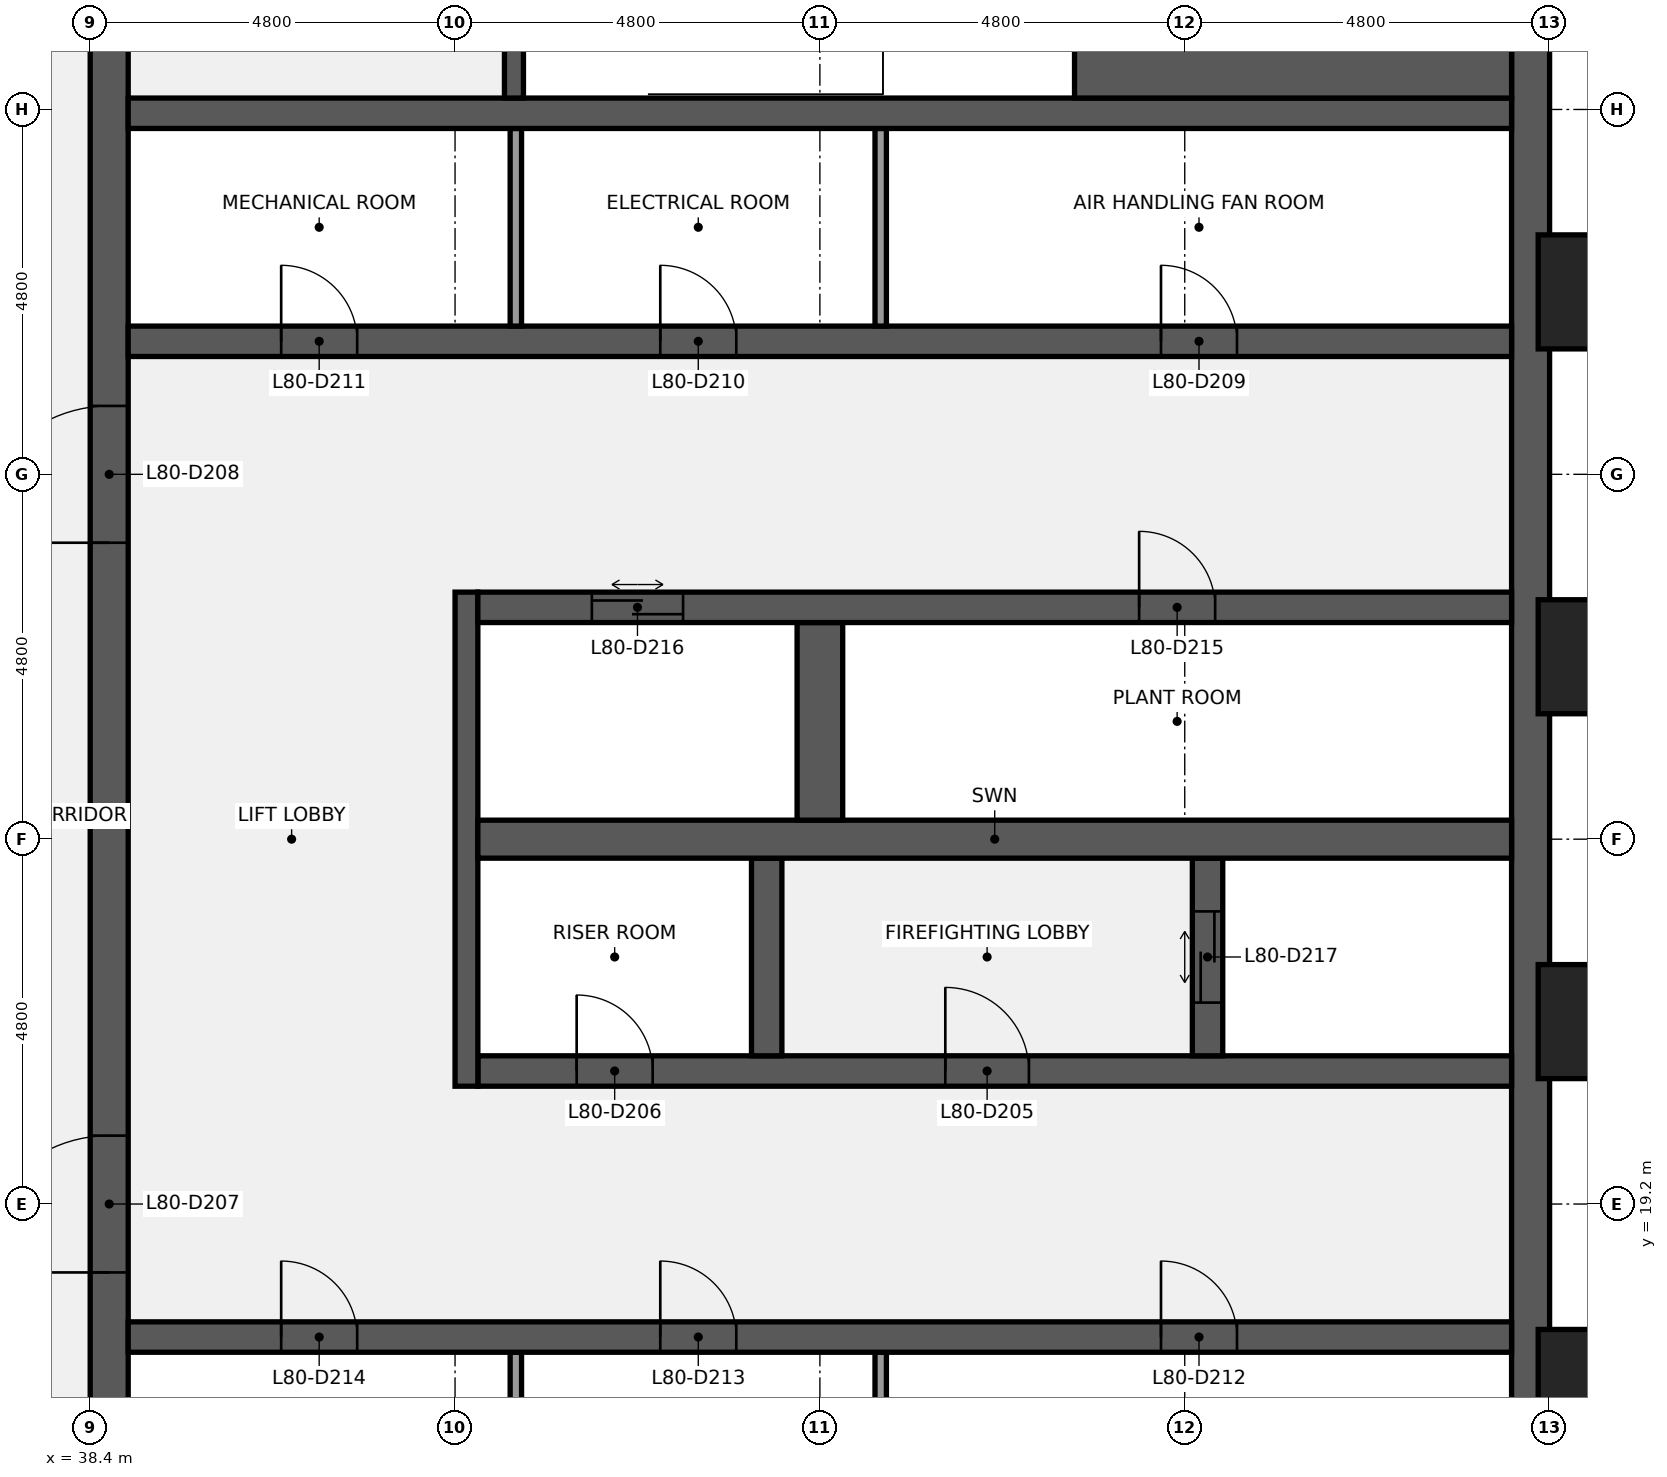
"""IFC4 building model, lengths in metres.
Left out: names, types, materials, properties, quantities, classifications, styles, units other than length and angle.
Written with IfcOpenShell. Run it as: python <this file> out.ifc"""

import sys

from ifc_helpers import new_model, si_unit, direction, frame, frame_2d, origin, origin_2d, place, context, subcontext, project, spatial, rectangle, extrude, element, fill, save


model = new_model("IFC4")
c1 = context("Model", 3, precision=1e-05, world=origin(), true_north=direction((0.0, 1.0)))
c2 = subcontext(c1, "Body", "Model", "MODEL_VIEW")
j1 = project(units=[si_unit("LENGTHUNIT", "METRE"), si_unit("PLANEANGLEUNIT", "RADIAN")], contexts=[c1])
p1 = place(None, origin())
s1 = spatial("IfcSite", under=j1, at=p1, CompositionType="ELEMENT")
p2 = place(p1, origin())
s2 = spatial("IfcBuilding", under=s1, at=p2, CompositionType="ELEMENT")
p3 = place(p2, frame((0.0, 0.0, 358.3)))
s3 = spatial("IfcBuildingStorey", under=s2, at=p3, CompositionType="ELEMENT", Elevation=358.3)
p4 = place(p3, frame((57.35, 38.4, 0.0), z_axis=(0.0, 0.0, 1.0), x_axis=(0.0, -1.0, 0.0)))
e1 = element("IfcWall", 1, at=p4, inside=s3, PredefinedType="SHEAR", context=c2, shape_type="SweptSolid", body=[
    extrude(rectangle(XDim=28.8, YDim=0.5, at=frame_2d((14.4, 0.0))), origin(), (0.0, 0.0, 1.0), 3.75),
])
p5 = place(p3, frame((38.65, 9.6, 0.0), z_axis=(0.0, 0.0, 1.0), x_axis=(0.0, 1.0, 0.0)))
e2 = element("IfcWall", 2, at=p5, inside=s3, PredefinedType="SHEAR", context=c2, shape_type="SweptSolid", body=[
    extrude(rectangle(XDim=28.8, YDim=0.5, at=frame_2d((14.4, 0.0))), origin(), (0.0, 0.0, 1.0), 3.75),
])
p6 = place(p5, frame((8.7, 0.0, 0.0)))
e3 = element("IfcOpeningElement", 3, at=p6, cuts=e2, PredefinedType="OPENING", context=c2, shape_type="SweptSolid", body=[
    extrude(rectangle(XDim=1.8, YDim=2.1, at=frame_2d((0.9, 1.05))), frame((0.0, 0.26, 0.0), z_axis=(0.0, -1.0, 0.0), x_axis=(1.0, 0.0, 0.0)), (0.0, 0.0, 1.0), 0.52),
])
p7 = place(p5, frame((18.3, 0.0, 0.0)))
e4 = element("IfcOpeningElement", 4, at=p7, cuts=e2, PredefinedType="OPENING", context=c2, shape_type="SweptSolid", body=[
    extrude(rectangle(XDim=1.8, YDim=2.1, at=frame_2d((0.9, 1.05))), frame((0.0, 0.26, 0.0), z_axis=(0.0, -1.0, 0.0), x_axis=(1.0, 0.0, 0.0)), (0.0, 0.0, 1.0), 0.52),
])
for number, where, z_axis, x_axis in (
    (5, (48.8, 14.65, 0.0), (0.0, 0.0, 1.0), (0.0, 1.0, 0.0)),
    (6, (44.0, 14.65, 0.0), (0.0, 0.0, 1.0), (0.0, 1.0, 0.0)),
):
    element("IfcWall", number, at=place(p3, frame(where, z_axis=z_axis, x_axis=x_axis)), inside=s3, PredefinedType="PARTITIONING", context=c2, shape_type="SweptSolid", body=[
        extrude(rectangle(XDim=2.6, YDim=0.15, at=frame_2d((1.3, 0.0))), origin(), (0.0, 0.0, 1.0), 3.75),
    ])
p8 = place(p3, frame((38.9, 17.45, 0.0), z_axis=(0.0, 0.0, 1.0), x_axis=(1.0, 0.0, 0.0)))
e7 = element("IfcWall", 7, at=p8, inside=s3, PredefinedType="SHEAR", context=c2, shape_type="SweptSolid", body=[
    extrude(rectangle(XDim=18.2, YDim=0.4, at=frame_2d((9.1, 0.0))), origin(), (0.0, 0.0, 1.0), 3.75),
])
p9 = place(p8, frame((13.587, 0.0, 0.0)))
e8 = element("IfcOpeningElement", 8, at=p9, cuts=e7, PredefinedType="OPENING", context=c2, shape_type="SweptSolid", body=[
    extrude(rectangle(XDim=1.0, YDim=2.1, at=frame_2d((0.5, 1.05))), frame((0.0, 0.21, 0.0), z_axis=(0.0, -1.0, 0.0), x_axis=(1.0, 0.0, 0.0)), (0.0, 0.0, 1.0), 0.42),
])
p10 = place(p8, frame((7.0, 0.0, 0.0)))
e9 = element("IfcOpeningElement", 9, at=p10, cuts=e7, PredefinedType="OPENING", context=c2, shape_type="SweptSolid", body=[
    extrude(rectangle(XDim=1.0, YDim=2.1, at=frame_2d((0.5, 1.05))), frame((0.0, 0.21, 0.0), z_axis=(0.0, -1.0, 0.0), x_axis=(1.0, 0.0, 0.0)), (0.0, 0.0, 1.0), 0.42),
])
p11 = place(p8, frame((2.012, 0.0, 0.0)))
e10 = element("IfcOpeningElement", 10, at=p11, cuts=e7, PredefinedType="OPENING", context=c2, shape_type="SweptSolid", body=[
    extrude(rectangle(XDim=1.0, YDim=2.1, at=frame_2d((0.5, 1.05))), frame((0.0, 0.21, 0.0), z_axis=(0.0, -1.0, 0.0), x_axis=(1.0, 0.0, 0.0)), (0.0, 0.0, 1.0), 0.42),
])
p12 = place(p3, frame((43.5, 20.95, 0.0), z_axis=(0.0, 0.0, 1.0), x_axis=(1.0, 0.0, 0.0)))
e11 = element("IfcWall", 11, at=p12, inside=s3, PredefinedType="SHEAR", context=c2, shape_type="SweptSolid", body=[
    extrude(rectangle(XDim=13.6, YDim=0.4, at=frame_2d((6.8, 0.0))), origin(), (0.0, 0.0, 1.0), 3.75),
])
p13 = place(p12, frame((6.15, 0.0, 0.0)))
e12 = element("IfcOpeningElement", 12, at=p13, cuts=e11, PredefinedType="OPENING", context=c2, shape_type="SweptSolid", body=[
    extrude(rectangle(XDim=1.1, YDim=2.1, at=frame_2d((0.55, 1.05))), frame((0.0, 0.21, 0.0), z_axis=(0.0, -1.0, 0.0), x_axis=(1.0, 0.0, 0.0)), (0.0, 0.0, 1.0), 0.42),
])
p14 = place(p12, frame((1.3, 0.0, 0.0)))
e13 = element("IfcOpeningElement", 13, at=p14, cuts=e11, PredefinedType="OPENING", context=c2, shape_type="SweptSolid", body=[
    extrude(rectangle(XDim=1.0, YDim=2.1, at=frame_2d((0.5, 1.05))), frame((0.0, 0.21, 0.0), z_axis=(0.0, -1.0, 0.0), x_axis=(1.0, 0.0, 0.0)), (0.0, 0.0, 1.0), 0.42),
])
p15 = place(p3, frame((43.35, 20.75, 0.0), z_axis=(0.0, 0.0, 1.0), x_axis=(0.0, 1.0, 0.0)))
e14 = element("IfcWall", 14, at=p15, inside=s3, PredefinedType="SHEAR", context=c2, shape_type="SweptSolid", body=[
    extrude(rectangle(XDim=6.5, YDim=0.3, at=frame_2d((3.25, 0.0))), origin(), (0.0, 0.0, 1.0), 3.75),
])
p16 = place(p3, frame((53.1, 21.15, 0.0), z_axis=(0.0, 0.0, 1.0), x_axis=(0.0, 1.0, 0.0)))
e15 = element("IfcWall", 15, at=p16, inside=s3, PredefinedType="SHEAR", context=c2, shape_type="SweptSolid", body=[
    extrude(rectangle(XDim=2.6, YDim=0.4, at=frame_2d((1.3, 0.0))), origin(), (0.0, 0.0, 1.0), 3.75),
])
p17 = place(p16, frame((0.7, 0.0, 0.0)))
e16 = element("IfcOpeningElement", 16, at=p17, cuts=e15, PredefinedType="OPENING", context=c2, shape_type="SweptSolid", body=[
    extrude(rectangle(XDim=1.2, YDim=2.1, at=frame_2d((0.6, 1.05))), frame((0.0, 0.21, 0.0), z_axis=(0.0, -1.0, 0.0), x_axis=(1.0, 0.0, 0.0)), (0.0, 0.0, 1.0), 0.42),
])
p18 = place(p3, frame((47.3, 21.15, 0.0), z_axis=(0.0, 0.0, 1.0), x_axis=(0.0, 1.0, 0.0)))
e17 = element("IfcWall", 17, at=p18, inside=s3, PredefinedType="SHEAR", context=c2, shape_type="SweptSolid", body=[
    extrude(rectangle(XDim=2.6, YDim=0.4, at=frame_2d((1.3, 0.0))), origin(), (0.0, 0.0, 1.0), 3.75),
])
p19 = place(p3, frame((43.5, 24.0, 0.0), z_axis=(0.0, 0.0, 1.0), x_axis=(1.0, 0.0, 0.0)))
e18 = element("IfcWall", 18, at=p19, inside=s3, PredefinedType="SHEAR", context=c2, shape_type="SweptSolid", body=[
    extrude(rectangle(XDim=13.6, YDim=0.5, at=frame_2d((6.8, 0.0))), origin(), (0.0, 0.0, 1.0), 3.75),
])
p20 = place(p3, frame((48.0, 24.25, 0.0), z_axis=(0.0, 0.0, 1.0), x_axis=(0.0, 1.0, 0.0)))
e19 = element("IfcWall", 19, at=p20, inside=s3, PredefinedType="SHEAR", context=c2, shape_type="SweptSolid", body=[
    extrude(rectangle(XDim=2.6, YDim=0.6, at=frame_2d((1.3, 0.0))), origin(), (0.0, 0.0, 1.0), 3.75),
])
p21 = place(p3, frame((43.5, 27.05, 0.0), z_axis=(0.0, 0.0, 1.0), x_axis=(1.0, 0.0, 0.0)))
e20 = element("IfcWall", 20, at=p21, inside=s3, PredefinedType="SHEAR", context=c2, shape_type="SweptSolid", body=[
    extrude(rectangle(XDim=13.6, YDim=0.4, at=frame_2d((6.8, 0.0))), origin(), (0.0, 0.0, 1.0), 3.75),
])
p22 = place(p21, frame((8.7, 0.0, 0.0)))
e21 = element("IfcOpeningElement", 21, at=p22, cuts=e20, PredefinedType="OPENING", context=c2, shape_type="SweptSolid", body=[
    extrude(rectangle(XDim=1.0, YDim=2.1, at=frame_2d((0.5, 1.05))), frame((0.0, 0.21, 0.0), z_axis=(0.0, -1.0, 0.0), x_axis=(1.0, 0.0, 0.0)), (0.0, 0.0, 1.0), 0.42),
])
p23 = place(p21, frame((1.5, 0.0, 0.0)))
e22 = element("IfcOpeningElement", 22, at=p23, cuts=e20, PredefinedType="OPENING", context=c2, shape_type="SweptSolid", body=[
    extrude(rectangle(XDim=1.2, YDim=2.1, at=frame_2d((0.6, 1.05))), frame((0.0, 0.21, 0.0), z_axis=(0.0, -1.0, 0.0), x_axis=(1.0, 0.0, 0.0)), (0.0, 0.0, 1.0), 0.42),
])
p24 = place(p3, frame((38.9, 30.55, 0.0), z_axis=(0.0, 0.0, 1.0), x_axis=(1.0, 0.0, 0.0)))
e23 = element("IfcWall", 23, at=p24, inside=s3, PredefinedType="SHEAR", context=c2, shape_type="SweptSolid", body=[
    extrude(rectangle(XDim=18.2, YDim=0.4, at=frame_2d((9.1, 0.0))), origin(), (0.0, 0.0, 1.0), 3.75),
])
p25 = place(p24, frame((13.587, 0.0, 0.0)))
e24 = element("IfcOpeningElement", 24, at=p25, cuts=e23, PredefinedType="OPENING", context=c2, shape_type="SweptSolid", body=[
    extrude(rectangle(XDim=1.0, YDim=2.1, at=frame_2d((0.5, 1.05))), frame((0.0, 0.21, 0.0), z_axis=(0.0, -1.0, 0.0), x_axis=(1.0, 0.0, 0.0)), (0.0, 0.0, 1.0), 0.42),
])
p26 = place(p24, frame((7.0, 0.0, 0.0)))
e25 = element("IfcOpeningElement", 25, at=p26, cuts=e23, PredefinedType="OPENING", context=c2, shape_type="SweptSolid", body=[
    extrude(rectangle(XDim=1.0, YDim=2.1, at=frame_2d((0.5, 1.05))), frame((0.0, 0.21, 0.0), z_axis=(0.0, -1.0, 0.0), x_axis=(1.0, 0.0, 0.0)), (0.0, 0.0, 1.0), 0.42),
])
p27 = place(p24, frame((2.012, 0.0, 0.0)))
e26 = element("IfcOpeningElement", 26, at=p27, cuts=e23, PredefinedType="OPENING", context=c2, shape_type="SweptSolid", body=[
    extrude(rectangle(XDim=1.0, YDim=2.1, at=frame_2d((0.5, 1.05))), frame((0.0, 0.21, 0.0), z_axis=(0.0, -1.0, 0.0), x_axis=(1.0, 0.0, 0.0)), (0.0, 0.0, 1.0), 0.42),
])
for number, where, z_axis, x_axis in (
    (27, (48.8, 30.75, 0.0), (0.0, 0.0, 1.0), (0.0, 1.0, 0.0)),
    (28, (44.0, 30.75, 0.0), (0.0, 0.0, 1.0), (0.0, 1.0, 0.0)),
):
    element("IfcWall", number, at=place(p3, frame(where, z_axis=z_axis, x_axis=x_axis)), inside=s3, PredefinedType="PARTITIONING", context=c2, shape_type="SweptSolid", body=[
        extrude(rectangle(XDim=2.6, YDim=0.15, at=frame_2d((1.3, 0.0))), origin(), (0.0, 0.0, 1.0), 3.75),
    ])
p28 = place(p3, frame((38.9, 33.55, 0.0), z_axis=(0.0, 0.0, 1.0), x_axis=(1.0, 0.0, 0.0)))
e29 = element("IfcWall", 29, at=p28, inside=s3, PredefinedType="SHEAR", context=c2, shape_type="SweptSolid", body=[
    extrude(rectangle(XDim=18.2, YDim=0.4, at=frame_2d((9.1, 0.0))), origin(), (0.0, 0.0, 1.0), 3.75),
])
p29 = place(p3, frame((51.35, 35.825, 0.0), z_axis=(0.0, 0.0, 1.0), x_axis=(1.0, 0.0, 0.0)))
e30 = element("IfcWall", 30, at=p29, inside=s3, PredefinedType="SHEAR", context=c2, shape_type="SweptSolid", body=[
    extrude(rectangle(XDim=5.75, YDim=4.15, at=frame_2d((2.875, 0.0))), origin(), (0.0, 0.0, 1.0), 3.75),
])
p30 = place(p3, frame((43.975, 33.75, 0.0), z_axis=(0.0, 0.0, 1.0), x_axis=(0.0, 1.0, 0.0)))
e31 = element("IfcWall", 31, at=p30, inside=s3, PredefinedType="SHEAR", context=c2, shape_type="SweptSolid", body=[
    extrude(rectangle(XDim=3.45, YDim=0.25, at=frame_2d((1.725, 0.0))), origin(), (0.0, 0.0, 1.0), 3.75),
])
p31 = place(p30, frame((1.175, 0.0, 0.0)))
e32 = element("IfcOpeningElement", 32, at=p31, cuts=e31, PredefinedType="OPENING", context=c2, shape_type="SweptSolid", body=[
    extrude(rectangle(XDim=1.1, YDim=2.1, at=frame_2d((0.55, 1.05))), frame((0.0, 0.135, 0.0), z_axis=(0.0, -1.0, 0.0), x_axis=(1.0, 0.0, 0.0)), (0.0, 0.0, 1.0), 0.27),
])
for number, where, z_axis, x_axis in (
    (33, (58.35, 16.8, 0.0), (0.0, 0.0, 1.0), (0.0, 1.0, 0.0)),
    (34, (58.35, 21.6, 0.0), (0.0, 0.0, 1.0), (0.0, 1.0, 0.0)),
    (35, (58.35, 26.4, 0.0), (0.0, 0.0, 1.0), (0.0, 1.0, 0.0)),
    (36, (58.35, 31.2, 0.0), (0.0, 0.0, 1.0), (0.0, 1.0, 0.0)),
):
    element("IfcColumn", number, at=place(p3, frame(where, z_axis=z_axis, x_axis=x_axis)), inside=s3, PredefinedType="PILASTER", context=c2, shape_type="SweptSolid", body=[
        extrude(rectangle(XDim=1.8, YDim=1.5, at=origin_2d()), origin(), (0.0, 0.0, 1.0), 4.0),
    ])
p32 = place(p13, origin())
e37 = element("IfcDoor", 37, at=p32, inside=s3, OperationType="SINGLE_SWING_LEFT", PredefinedType="DOOR", context=c2, shape_type="SweptSolid", body=[
    extrude(rectangle(XDim=1.1, YDim=2.1, at=frame_2d((0.55, 1.05))), frame((0.0, 0.025, 0.0), z_axis=(0.0, -1.0, 0.0), x_axis=(1.0, 0.0, 0.0)), (0.0, 0.0, 1.0), 0.05),
])
fill(e12, e37)
p33 = place(p14, origin())
e38 = element("IfcDoor", 38, at=p33, inside=s3, OperationType="SINGLE_SWING_LEFT", PredefinedType="DOOR", context=c2, shape_type="SweptSolid", body=[
    extrude(rectangle(XDim=1.0, YDim=2.1, at=frame_2d((0.5, 1.05))), frame((0.0, 0.025, 0.0), z_axis=(0.0, -1.0, 0.0), x_axis=(1.0, 0.0, 0.0)), (0.0, 0.0, 1.0), 0.05),
])
fill(e13, e38)
p34 = place(p6, origin())
e39 = element("IfcDoor", 39, at=p34, inside=s3, OperationType="DOUBLE_DOOR_SINGLE_SWING", PredefinedType="DOOR", context=c2, shape_type="SweptSolid", body=[
    extrude(rectangle(XDim=1.8, YDim=2.1, at=frame_2d((0.9, 1.05))), frame((0.0, 0.025, 0.0), z_axis=(0.0, -1.0, 0.0), x_axis=(1.0, 0.0, 0.0)), (0.0, 0.0, 1.0), 0.05),
])
fill(e3, e39)
p35 = place(p7, origin())
e40 = element("IfcDoor", 40, at=p35, inside=s3, OperationType="DOUBLE_DOOR_SINGLE_SWING", PredefinedType="DOOR", context=c2, shape_type="SweptSolid", body=[
    extrude(rectangle(XDim=1.8, YDim=2.1, at=frame_2d((0.9, 1.05))), frame((0.0, 0.025, 0.0), z_axis=(0.0, -1.0, 0.0), x_axis=(1.0, 0.0, 0.0)), (0.0, 0.0, 1.0), 0.05),
])
fill(e4, e40)
p36 = place(p25, origin())
e41 = element("IfcDoor", 41, at=p36, inside=s3, OperationType="SINGLE_SWING_LEFT", PredefinedType="DOOR", context=c2, shape_type="SweptSolid", body=[
    extrude(rectangle(XDim=1.0, YDim=2.1, at=frame_2d((0.5, 1.05))), frame((0.0, 0.025, 0.0), z_axis=(0.0, -1.0, 0.0), x_axis=(1.0, 0.0, 0.0)), (0.0, 0.0, 1.0), 0.05),
])
fill(e24, e41)
p37 = place(p26, origin())
e42 = element("IfcDoor", 42, at=p37, inside=s3, OperationType="SINGLE_SWING_LEFT", PredefinedType="DOOR", context=c2, shape_type="SweptSolid", body=[
    extrude(rectangle(XDim=1.0, YDim=2.1, at=frame_2d((0.5, 1.05))), frame((0.0, 0.025, 0.0), z_axis=(0.0, -1.0, 0.0), x_axis=(1.0, 0.0, 0.0)), (0.0, 0.0, 1.0), 0.05),
])
fill(e25, e42)
p38 = place(p27, origin())
e43 = element("IfcDoor", 43, at=p38, inside=s3, OperationType="SINGLE_SWING_LEFT", PredefinedType="DOOR", context=c2, shape_type="SweptSolid", body=[
    extrude(rectangle(XDim=1.0, YDim=2.1, at=frame_2d((0.5, 1.05))), frame((0.0, 0.025, 0.0), z_axis=(0.0, -1.0, 0.0), x_axis=(1.0, 0.0, 0.0)), (0.0, 0.0, 1.0), 0.05),
])
fill(e26, e43)
p39 = place(p9, origin())
e44 = element("IfcDoor", 44, at=p39, inside=s3, OperationType="SINGLE_SWING_LEFT", PredefinedType="DOOR", context=c2, shape_type="SweptSolid", body=[
    extrude(rectangle(XDim=1.0, YDim=2.1, at=frame_2d((0.5, 1.05))), frame((0.0, 0.025, 0.0), z_axis=(0.0, -1.0, 0.0), x_axis=(1.0, 0.0, 0.0)), (0.0, 0.0, 1.0), 0.05),
])
fill(e8, e44)
p40 = place(p10, origin())
e45 = element("IfcDoor", 45, at=p40, inside=s3, OperationType="SINGLE_SWING_LEFT", PredefinedType="DOOR", context=c2, shape_type="SweptSolid", body=[
    extrude(rectangle(XDim=1.0, YDim=2.1, at=frame_2d((0.5, 1.05))), frame((0.0, 0.025, 0.0), z_axis=(0.0, -1.0, 0.0), x_axis=(1.0, 0.0, 0.0)), (0.0, 0.0, 1.0), 0.05),
])
fill(e9, e45)
p41 = place(p11, origin())
e46 = element("IfcDoor", 46, at=p41, inside=s3, OperationType="SINGLE_SWING_LEFT", PredefinedType="DOOR", context=c2, shape_type="SweptSolid", body=[
    extrude(rectangle(XDim=1.0, YDim=2.1, at=frame_2d((0.5, 1.05))), frame((0.0, 0.025, 0.0), z_axis=(0.0, -1.0, 0.0), x_axis=(1.0, 0.0, 0.0)), (0.0, 0.0, 1.0), 0.05),
])
fill(e10, e46)
p42 = place(p22, origin())
e47 = element("IfcDoor", 47, at=p42, inside=s3, OperationType="SINGLE_SWING_LEFT", PredefinedType="DOOR", context=c2, shape_type="SweptSolid", body=[
    extrude(rectangle(XDim=1.0, YDim=2.1, at=frame_2d((0.5, 1.05))), frame((0.0, 0.025, 0.0), z_axis=(0.0, -1.0, 0.0), x_axis=(1.0, 0.0, 0.0)), (0.0, 0.0, 1.0), 0.05),
])
fill(e21, e47)
p43 = place(p23, origin())
e48 = element("IfcDoor", 48, at=p43, inside=s3, OperationType="DOUBLE_DOOR_SLIDING", PredefinedType="DOOR", context=c2, shape_type="SweptSolid", body=[
    extrude(rectangle(XDim=1.2, YDim=2.1, at=frame_2d((0.6, 1.05))), frame((0.0, 0.025, 0.0), z_axis=(0.0, -1.0, 0.0), x_axis=(1.0, 0.0, 0.0)), (0.0, 0.0, 1.0), 0.05),
])
fill(e22, e48)
p44 = place(p17, origin())
e49 = element("IfcDoor", 49, at=p44, inside=s3, OperationType="DOUBLE_DOOR_SLIDING", PredefinedType="DOOR", context=c2, shape_type="SweptSolid", body=[
    extrude(rectangle(XDim=1.2, YDim=2.1, at=frame_2d((0.6, 1.05))), frame((0.0, 0.025, 0.0), z_axis=(0.0, -1.0, 0.0), x_axis=(1.0, 0.0, 0.0)), (0.0, 0.0, 1.0), 0.05),
])
fill(e16, e49)
save(model, sys.argv[1])
